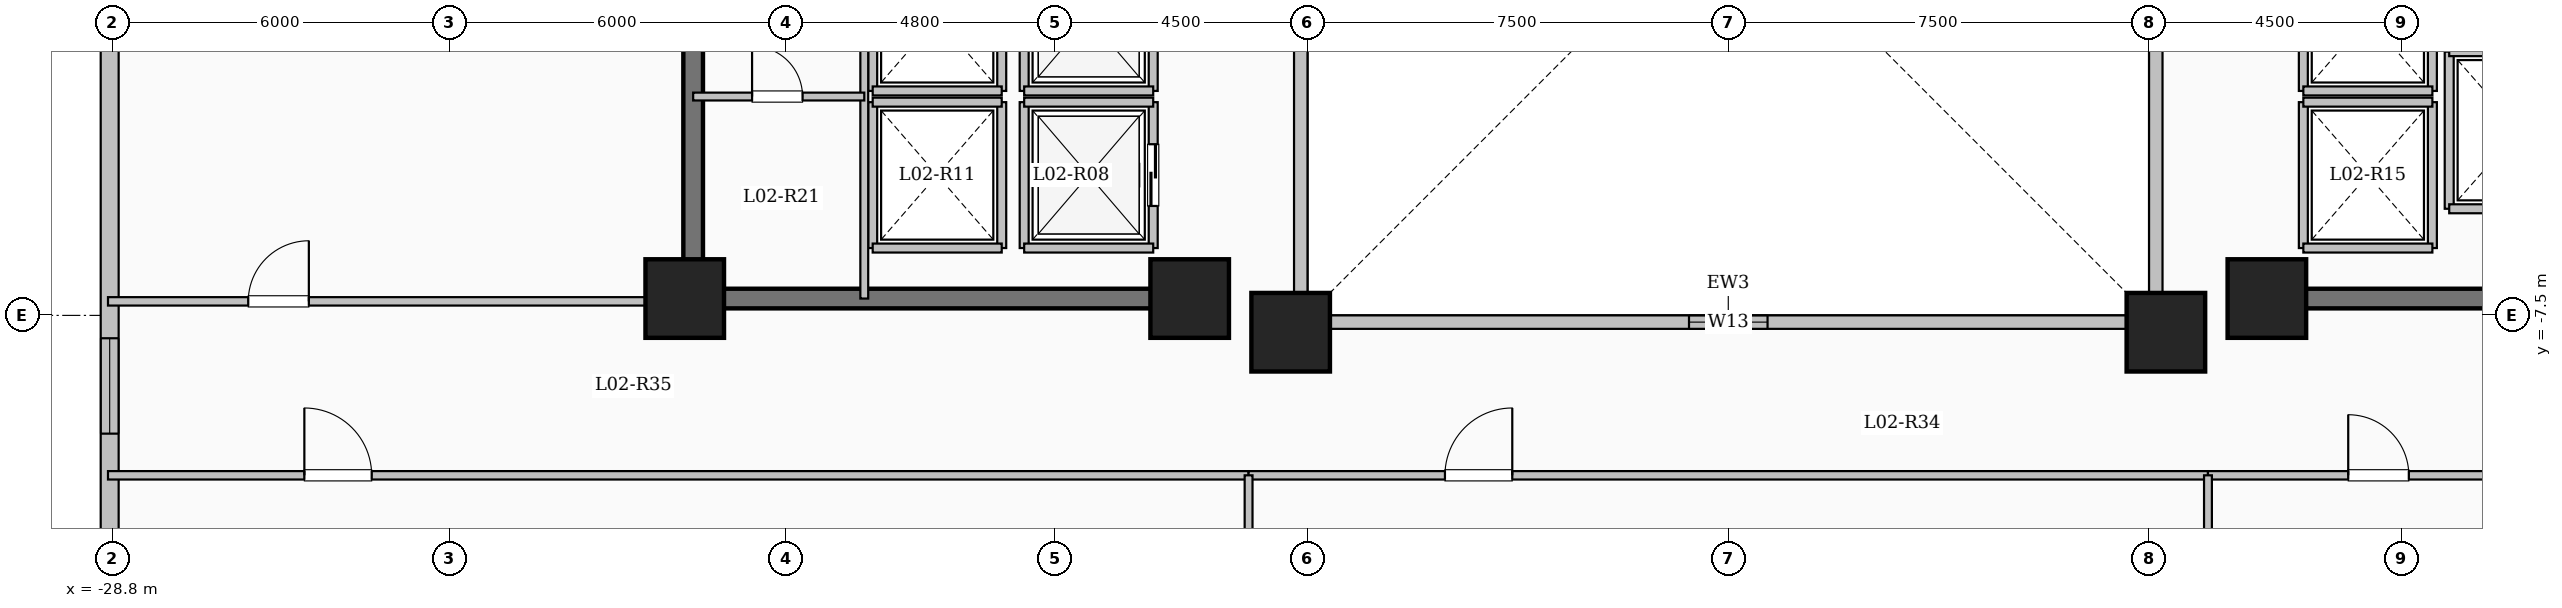
"""IFC4 building model, lengths in metres.
Left out: names, types, materials, properties, quantities, classifications, styles, units other than length and angle.
Written with IfcOpenShell. Run it as: python <this file> out.ifc"""

import sys

from ifc_helpers import new_model, si_unit, direction, frame, frame_2d, origin, origin_2d, place, context, subcontext, project, spatial, rectangle, extrude, element, fill, save


model = new_model("IFC4")
c1 = context("Model", 3, precision=1e-05, world=origin(), true_north=direction((0.0, 1.0)))
c2 = subcontext(c1, "Body", "Model", "MODEL_VIEW")
j1 = project(units=[si_unit("LENGTHUNIT", "METRE"), si_unit("PLANEANGLEUNIT", "RADIAN")], contexts=[c1])
p1 = place(None, origin())
s1 = spatial("IfcSite", under=j1, at=p1, CompositionType="ELEMENT")
p2 = place(p1, origin())
s2 = spatial("IfcBuilding", under=s1, at=p2, CompositionType="ELEMENT")
p3 = place(p2, frame((0.0, 0.0, 9.9)))
s3 = spatial("IfcBuildingStorey", under=s2, at=p3, CompositionType="ELEMENT", Elevation=9.9)
for number, where, z_axis, x_axis in (
    (1, (-7.8, -7.8, 0.0), (0.0, 0.0, 1.0), (1.0, 0.0, 0.0)),
    (2, (7.8, -7.8, 0.0), (0.0, 0.0, 1.0), (1.0, 0.0, 0.0)),
    (3, (-9.6, -7.2, 0.0), (0.0, 0.0, 1.0), (1.0, 0.0, 0.0)),
    (4, (9.6, -7.2, 0.0), (0.0, 0.0, 1.0), (1.0, 0.0, 0.0)),
    (5, (-18.6, -7.2, 0.0), (0.0, 0.0, 1.0), (1.0, 0.0, 0.0)),
):
    element("IfcColumn", number, at=place(p3, frame(where, z_axis=z_axis, x_axis=x_axis)), inside=s3, PredefinedType="COLUMN", context=c2, shape_type="SweptSolid", body=[
        extrude(rectangle(XDim=1.4, YDim=1.4, at=origin_2d()), origin(), (0.0, 0.0, 1.0), 4.5),
    ])
p4 = place(p3, frame((-7.62, -7.62, 0.0), z_axis=(0.0, 0.0, 1.0), x_axis=(1.0, 0.0, 0.0)))
e6 = element("IfcWall", 6, at=p4, inside=s3, PredefinedType="SOLIDWALL", context=c2, shape_type="SweptSolid", body=[
    extrude(rectangle(XDim=15.24, YDim=0.24, at=frame_2d((7.62, 0.0))), origin(), (0.0, 0.0, 1.0), 4.2),
])
p5 = place(p4, frame((6.92, 0.0, 0.95)))
e7 = element("IfcOpeningElement", 7, at=p5, cuts=e6, PredefinedType="OPENING", context=c2, shape_type="SweptSolid", body=[
    extrude(rectangle(XDim=1.4, YDim=1.5, at=frame_2d((0.7, 0.75))), frame((0.0, 0.13, 0.0), z_axis=(0.0, -1.0, 0.0), x_axis=(1.0, 0.0, 0.0)), (0.0, 0.0, 1.0), 0.26),
])
p6 = place(p3, frame((7.62, -7.62, 0.0), z_axis=(0.0, 0.0, 1.0), x_axis=(0.0, 1.0, 0.0)))
e8 = element("IfcWall", 8, at=p6, inside=s3, PredefinedType="SOLIDWALL", context=c2, shape_type="SweptSolid", body=[
    extrude(rectangle(XDim=15.24, YDim=0.24, at=frame_2d((7.62, 0.0))), origin(), (0.0, 0.0, 1.0), 4.2),
])
p7 = place(p6, frame((6.92, 0.0, 0.95)))
e9 = element("IfcOpeningElement", 9, at=p7, cuts=e8, PredefinedType="OPENING", context=c2, shape_type="SweptSolid", body=[
    extrude(rectangle(XDim=1.4, YDim=1.5, at=frame_2d((0.7, 0.75))), frame((0.0, 0.13, 0.0), z_axis=(0.0, -1.0, 0.0), x_axis=(1.0, 0.0, 0.0)), (0.0, 0.0, 1.0), 0.26),
])
p8 = place(p3, frame((-7.62, 7.62, 0.0), z_axis=(0.0, 0.0, 1.0), x_axis=(0.0, -1.0, 0.0)))
e10 = element("IfcWall", 10, at=p8, inside=s3, PredefinedType="SOLIDWALL", context=c2, shape_type="SweptSolid", body=[
    extrude(rectangle(XDim=15.24, YDim=0.24, at=frame_2d((7.62, 0.0))), origin(), (0.0, 0.0, 1.0), 4.2),
])
p9 = place(p8, frame((6.92, 0.0, 0.95)))
e11 = element("IfcOpeningElement", 11, at=p9, cuts=e10, PredefinedType="OPENING", context=c2, shape_type="SweptSolid", body=[
    extrude(rectangle(XDim=1.4, YDim=1.5, at=frame_2d((0.7, 0.75))), frame((0.0, 0.13, 0.0), z_axis=(0.0, -1.0, 0.0), x_axis=(1.0, 0.0, 0.0)), (0.0, 0.0, 1.0), 0.26),
])
p10 = place(p3, frame((-28.85, -29.85, 0.0), z_axis=(0.0, 0.0, 1.0), x_axis=(0.0, 1.0, 0.0)))
e12 = element("IfcWall", 12, at=p10, inside=s3, PredefinedType="SOLIDWALL", context=c2, shape_type="SweptSolid", body=[
    extrude(rectangle(XDim=59.7, YDim=0.32, at=frame_2d((29.85, 0.0))), origin(), (0.0, 0.0, 1.0), 4.2),
])
p11 = place(p10, frame((8.65, 0.0, 0.9)))
e13 = element("IfcOpeningElement", 13, at=p11, cuts=e12, PredefinedType="OPENING", context=c2, shape_type="SweptSolid", body=[
    extrude(rectangle(XDim=2.1, YDim=2.0, at=frame_2d((1.05, 1.0))), frame((0.0, 0.17, 0.0), z_axis=(0.0, -1.0, 0.0), x_axis=(1.0, 0.0, 0.0)), (0.0, 0.0, 1.0), 0.34),
])
p12 = place(p10, frame((20.242, 0.0, 0.9)))
e14 = element("IfcOpeningElement", 14, at=p12, cuts=e12, PredefinedType="OPENING", context=c2, shape_type="SweptSolid", body=[
    extrude(rectangle(XDim=1.7, YDim=1.9, at=frame_2d((0.85, 0.95))), frame((0.0, 0.17, 0.0), z_axis=(0.0, -1.0, 0.0), x_axis=(1.0, 0.0, 0.0)), (0.0, 0.0, 1.0), 0.34),
])
p13 = place(p10, frame((30.55, 0.0, 0.9)))
e15 = element("IfcOpeningElement", 15, at=p13, cuts=e12, PredefinedType="OPENING", context=c2, shape_type="SweptSolid", body=[
    extrude(rectangle(XDim=2.1, YDim=2.0, at=frame_2d((1.05, 1.0))), frame((0.0, 0.17, 0.0), z_axis=(0.0, -1.0, 0.0), x_axis=(1.0, 0.0, 0.0)), (0.0, 0.0, 1.0), 0.34),
])
p14 = place(p10, frame((40.975, 0.0, 0.95)))
e16 = element("IfcOpeningElement", 16, at=p14, cuts=e12, PredefinedType="OPENING", context=c2, shape_type="SweptSolid", body=[
    extrude(rectangle(XDim=1.0, YDim=1.5, at=frame_2d((0.5, 0.75))), frame((0.0, 0.17, 0.0), z_axis=(0.0, -1.0, 0.0), x_axis=(1.0, 0.0, 0.0)), (0.0, 0.0, 1.0), 0.34),
])
p15 = place(p10, frame((50.0, 0.0, 0.9)))
e17 = element("IfcOpeningElement", 17, at=p15, cuts=e12, PredefinedType="OPENING", context=c2, shape_type="SweptSolid", body=[
    extrude(rectangle(XDim=2.1, YDim=2.0, at=frame_2d((1.05, 1.0))), frame((0.0, 0.17, 0.0), z_axis=(0.0, -1.0, 0.0), x_axis=(1.0, 0.0, 0.0)), (0.0, 0.0, 1.0), 0.34),
])
p16 = place(p3, frame((-12.55, -6.3, 0.0), z_axis=(0.0, 0.0, 1.0), x_axis=(0.0, 1.0, 0.0)))
e18 = element("IfcWall", 18, at=p16, inside=s3, PredefinedType="SOLIDWALL", context=c2, shape_type="SweptSolid", body=[
    extrude(rectangle(XDim=2.6, YDim=0.16, at=frame_2d((1.3, 0.0))), origin(), (0.0, 0.0, 1.0), 4.2),
])
p17 = place(p3, frame((-10.25, -6.3, 0.0), z_axis=(0.0, 0.0, 1.0), x_axis=(0.0, 1.0, 0.0)))
e19 = element("IfcWall", 19, at=p17, inside=s3, PredefinedType="SOLIDWALL", context=c2, shape_type="SweptSolid", body=[
    extrude(rectangle(XDim=2.6, YDim=0.16, at=frame_2d((1.3, 0.0))), origin(), (0.0, 0.0, 1.0), 4.2),
])
p18 = place(p17, frame((0.75, 0.0, 0.0)))
e20 = element("IfcOpeningElement", 20, at=p18, cuts=e19, PredefinedType="OPENING", context=c2, shape_type="SweptSolid", body=[
    extrude(rectangle(XDim=1.1, YDim=2.15, at=frame_2d((0.55, 1.075))), frame((0.0, 0.09, 0.0), z_axis=(0.0, -1.0, 0.0), x_axis=(1.0, 0.0, 0.0)), (0.0, 0.0, 1.0), 0.18),
])
for number, where, z_axis, x_axis in (
    (21, (-12.55, -6.3, 0.0), (0.0, 0.0, 1.0), (1.0, 0.0, 0.0)),
    (22, (-12.55, -3.7, 0.0), (0.0, 0.0, 1.0), (1.0, 0.0, 0.0)),
):
    element("IfcWall", number, at=place(p3, frame(where, z_axis=z_axis, x_axis=x_axis)), inside=s3, PredefinedType="SOLIDWALL", context=c2, shape_type="SweptSolid", body=[
        extrude(rectangle(XDim=2.3, YDim=0.16, at=frame_2d((1.15, 0.0))), origin(), (0.0, 0.0, 1.0), 4.2),
    ])
p19 = place(p3, frame((-12.55, -3.5, 0.0), z_axis=(0.0, 0.0, 1.0), x_axis=(0.0, 1.0, 0.0)))
e23 = element("IfcWall", 23, at=p19, inside=s3, PredefinedType="SOLIDWALL", context=c2, shape_type="SweptSolid", body=[
    extrude(rectangle(XDim=2.6, YDim=0.16, at=frame_2d((1.3, 0.0))), origin(), (0.0, 0.0, 1.0), 4.2),
])
p20 = place(p3, frame((-10.25, -3.5, 0.0), z_axis=(0.0, 0.0, 1.0), x_axis=(0.0, 1.0, 0.0)))
e24 = element("IfcWall", 24, at=p20, inside=s3, PredefinedType="SOLIDWALL", context=c2, shape_type="SweptSolid", body=[
    extrude(rectangle(XDim=2.6, YDim=0.16, at=frame_2d((1.3, 0.0))), origin(), (0.0, 0.0, 1.0), 4.2),
])
p21 = place(p20, frame((0.75, 0.0, 0.0)))
e25 = element("IfcOpeningElement", 25, at=p21, cuts=e24, PredefinedType="OPENING", context=c2, shape_type="SweptSolid", body=[
    extrude(rectangle(XDim=1.1, YDim=2.15, at=frame_2d((0.55, 1.075))), frame((0.0, 0.09, 0.0), z_axis=(0.0, -1.0, 0.0), x_axis=(1.0, 0.0, 0.0)), (0.0, 0.0, 1.0), 0.18),
])
p22 = place(p3, frame((-12.55, -3.5, 0.0), z_axis=(0.0, 0.0, 1.0), x_axis=(1.0, 0.0, 0.0)))
e26 = element("IfcWall", 26, at=p22, inside=s3, PredefinedType="SOLIDWALL", context=c2, shape_type="SweptSolid", body=[
    extrude(rectangle(XDim=2.3, YDim=0.16, at=frame_2d((1.15, 0.0))), origin(), (0.0, 0.0, 1.0), 4.2),
])
for number, where, z_axis, x_axis in (
    (27, (-15.25, -6.3, 0.0), (0.0, 0.0, 1.0), (0.0, 1.0, 0.0)),
    (28, (-12.95, -6.3, 0.0), (0.0, 0.0, 1.0), (0.0, 1.0, 0.0)),
):
    element("IfcWall", number, at=place(p3, frame(where, z_axis=z_axis, x_axis=x_axis)), inside=s3, PredefinedType="SOLIDWALL", context=c2, shape_type="SweptSolid", body=[
        extrude(rectangle(XDim=2.6, YDim=0.16, at=frame_2d((1.3, 0.0))), origin(), (0.0, 0.0, 1.0), 4.2),
    ])
for number, where, z_axis, x_axis in (
    (29, (-15.25, -6.3, 0.0), (0.0, 0.0, 1.0), (1.0, 0.0, 0.0)),
    (30, (-15.25, -3.7, 0.0), (0.0, 0.0, 1.0), (1.0, 0.0, 0.0)),
):
    element("IfcWall", number, at=place(p3, frame(where, z_axis=z_axis, x_axis=x_axis)), inside=s3, PredefinedType="SOLIDWALL", context=c2, shape_type="SweptSolid", body=[
        extrude(rectangle(XDim=2.3, YDim=0.16, at=frame_2d((1.15, 0.0))), origin(), (0.0, 0.0, 1.0), 4.2),
    ])
for number, where, z_axis, x_axis in (
    (31, (-15.25, -3.5, 0.0), (0.0, 0.0, 1.0), (0.0, 1.0, 0.0)),
    (32, (-12.95, -3.5, 0.0), (0.0, 0.0, 1.0), (0.0, 1.0, 0.0)),
):
    element("IfcWall", number, at=place(p3, frame(where, z_axis=z_axis, x_axis=x_axis)), inside=s3, PredefinedType="SOLIDWALL", context=c2, shape_type="SweptSolid", body=[
        extrude(rectangle(XDim=2.6, YDim=0.16, at=frame_2d((1.3, 0.0))), origin(), (0.0, 0.0, 1.0), 4.2),
    ])
p23 = place(p3, frame((-15.25, -3.5, 0.0), z_axis=(0.0, 0.0, 1.0), x_axis=(1.0, 0.0, 0.0)))
e33 = element("IfcWall", 33, at=p23, inside=s3, PredefinedType="SOLIDWALL", context=c2, shape_type="SweptSolid", body=[
    extrude(rectangle(XDim=2.3, YDim=0.16, at=frame_2d((1.15, 0.0))), origin(), (0.0, 0.0, 1.0), 4.2),
])
for number, where, z_axis, x_axis in (
    (34, (10.25, -6.3, 0.0), (0.0, 0.0, 1.0), (0.0, 1.0, 0.0)),
    (35, (12.55, -6.3, 0.0), (0.0, 0.0, 1.0), (0.0, 1.0, 0.0)),
):
    element("IfcWall", number, at=place(p3, frame(where, z_axis=z_axis, x_axis=x_axis)), inside=s3, PredefinedType="SOLIDWALL", context=c2, shape_type="SweptSolid", body=[
        extrude(rectangle(XDim=2.6, YDim=0.16, at=frame_2d((1.3, 0.0))), origin(), (0.0, 0.0, 1.0), 4.2),
    ])
for number, where, z_axis, x_axis in (
    (36, (10.25, -6.3, 0.0), (0.0, 0.0, 1.0), (1.0, 0.0, 0.0)),
    (37, (10.25, -3.7, 0.0), (0.0, 0.0, 1.0), (1.0, 0.0, 0.0)),
):
    element("IfcWall", number, at=place(p3, frame(where, z_axis=z_axis, x_axis=x_axis)), inside=s3, PredefinedType="SOLIDWALL", context=c2, shape_type="SweptSolid", body=[
        extrude(rectangle(XDim=2.3, YDim=0.16, at=frame_2d((1.15, 0.0))), origin(), (0.0, 0.0, 1.0), 4.2),
    ])
for number, where, z_axis, x_axis in (
    (38, (10.25, -3.5, 0.0), (0.0, 0.0, 1.0), (0.0, 1.0, 0.0)),
    (39, (12.55, -3.5, 0.0), (0.0, 0.0, 1.0), (0.0, 1.0, 0.0)),
):
    element("IfcWall", number, at=place(p3, frame(where, z_axis=z_axis, x_axis=x_axis)), inside=s3, PredefinedType="SOLIDWALL", context=c2, shape_type="SweptSolid", body=[
        extrude(rectangle(XDim=2.6, YDim=0.16, at=frame_2d((1.3, 0.0))), origin(), (0.0, 0.0, 1.0), 4.2),
    ])
p24 = place(p3, frame((10.25, -3.5, 0.0), z_axis=(0.0, 0.0, 1.0), x_axis=(1.0, 0.0, 0.0)))
e40 = element("IfcWall", 40, at=p24, inside=s3, PredefinedType="SOLIDWALL", context=c2, shape_type="SweptSolid", body=[
    extrude(rectangle(XDim=2.3, YDim=0.16, at=frame_2d((1.15, 0.0))), origin(), (0.0, 0.0, 1.0), 4.2),
])
p25 = place(p3, frame((12.85, -5.6, 0.0), z_axis=(0.0, 0.0, 1.0), x_axis=(0.0, 1.0, 0.0)))
e41 = element("IfcWall", 41, at=p25, inside=s3, PredefinedType="SOLIDWALL", context=c2, shape_type="SweptSolid", body=[
    extrude(rectangle(XDim=2.8, YDim=0.16, at=frame_2d((1.4, 0.0))), origin(), (0.0, 0.0, 1.0), 4.2),
])
for number, where, z_axis, x_axis in (
    (42, (12.85, -5.6, 0.0), (0.0, 0.0, 1.0), (1.0, 0.0, 0.0)),
    (43, (12.85, -2.8, 0.0), (0.0, 0.0, 1.0), (1.0, 0.0, 0.0)),
):
    element("IfcWall", number, at=place(p3, frame(where, z_axis=z_axis, x_axis=x_axis)), inside=s3, PredefinedType="SOLIDWALL", context=c2, shape_type="SweptSolid", body=[
        extrude(rectangle(XDim=2.5, YDim=0.16, at=frame_2d((1.25, 0.0))), origin(), (0.0, 0.0, 1.0), 4.2),
    ])
p26 = place(p3, frame((-18.45, -7.375, 0.0), z_axis=(0.0, 0.0, 1.0), x_axis=(0.0, 1.0, 0.0)))
e44 = element("IfcWall", 44, at=p26, inside=s3, PredefinedType="SHEAR", context=c2, shape_type="SweptSolid", body=[
    extrude(rectangle(XDim=14.05, YDim=0.35, at=frame_2d((7.025, 0.0))), origin(), (0.0, 0.0, 1.0), 4.5),
])
for number, where, z_axis, x_axis in (
    (45, (-18.625, -7.2, 0.0), (0.0, 0.0, 1.0), (1.0, 0.0, 0.0)),
    (46, (10.075, -7.2, 0.0), (0.0, 0.0, 1.0), (1.0, 0.0, 0.0)),
):
    element("IfcWall", number, at=place(p3, frame(where, z_axis=z_axis, x_axis=x_axis)), inside=s3, PredefinedType="SHEAR", context=c2, shape_type="SweptSolid", body=[
        extrude(rectangle(XDim=8.55, YDim=0.35, at=frame_2d((4.275, 0.0))), origin(), (0.0, 0.0, 1.0), 4.5),
    ])
p27 = place(p3, frame((-15.4, -7.2, 0.0), z_axis=(0.0, 0.0, 1.0), x_axis=(0.0, 1.0, 0.0)))
e47 = element("IfcWall", 47, at=p27, inside=s3, PredefinedType="PARTITIONING", context=c2, shape_type="SweptSolid", body=[
    extrude(rectangle(XDim=10.45, YDim=0.14, at=frame_2d((5.225, 0.0))), origin(), (0.0, 0.0, 1.0), 4.2),
])
p28 = place(p27, frame((9.25, 0.0, 0.0)))
e48 = element("IfcOpeningElement", 48, at=p28, cuts=e47, PredefinedType="OPENING", context=c2, shape_type="SweptSolid", body=[
    extrude(rectangle(XDim=0.9, YDim=2.08, at=frame_2d((0.45, 1.04))), frame((0.0, 0.08, 0.0), z_axis=(0.0, -1.0, 0.0), x_axis=(1.0, 0.0, 0.0)), (0.0, 0.0, 1.0), 0.16),
])
p29 = place(p3, frame((-18.45, -3.6, 0.0), z_axis=(0.0, 0.0, 1.0), x_axis=(1.0, 0.0, 0.0)))
e49 = element("IfcWall", 49, at=p29, inside=s3, PredefinedType="PARTITIONING", context=c2, shape_type="SweptSolid", body=[
    extrude(rectangle(XDim=3.05, YDim=0.14, at=frame_2d((1.525, 0.0))), origin(), (0.0, 0.0, 1.0), 4.2),
])
p30 = place(p29, frame((1.05, 0.0, 0.0)))
e50 = element("IfcOpeningElement", 50, at=p30, cuts=e49, PredefinedType="OPENING", context=c2, shape_type="SweptSolid", body=[
    extrude(rectangle(XDim=0.9, YDim=2.08, at=frame_2d((0.45, 1.04))), frame((0.0, 0.08, 0.0), z_axis=(0.0, -1.0, 0.0), x_axis=(1.0, 0.0, 0.0)), (0.0, 0.0, 1.0), 0.16),
])
p31 = place(p3, frame((-28.88, -10.35, 0.0), z_axis=(0.0, 0.0, 1.0), x_axis=(1.0, 0.0, 0.0)))
e51 = element("IfcWall", 51, at=p31, inside=s3, PredefinedType="PARTITIONING", context=c2, shape_type="SweptSolid", body=[
    extrude(rectangle(XDim=20.33, YDim=0.15, at=frame_2d((10.165, 0.0))), origin(), (0.0, 0.0, 1.0), 4.2),
])
p32 = place(p31, frame((3.5, 0.0, 0.0)))
e52 = element("IfcOpeningElement", 52, at=p32, cuts=e51, PredefinedType="OPENING", context=c2, shape_type="SweptSolid", body=[
    extrude(rectangle(XDim=1.2, YDim=2.15, at=frame_2d((0.6, 1.075))), frame((0.0, 0.085, 0.0), z_axis=(0.0, -1.0, 0.0), x_axis=(1.0, 0.0, 0.0)), (0.0, 0.0, 1.0), 0.17),
])
p33 = place(p3, frame((-8.55, -10.35, 0.0), z_axis=(0.0, 0.0, 1.0), x_axis=(1.0, 0.0, 0.0)))
e53 = element("IfcWall", 53, at=p33, inside=s3, PredefinedType="PARTITIONING", context=c2, shape_type="SweptSolid", body=[
    extrude(rectangle(XDim=17.1, YDim=0.15, at=frame_2d((8.55, 0.0))), origin(), (0.0, 0.0, 1.0), 4.2),
])
p34 = place(p33, frame((3.5, 0.0, 0.0)))
e54 = element("IfcOpeningElement", 54, at=p34, cuts=e53, PredefinedType="OPENING", context=c2, shape_type="SweptSolid", body=[
    extrude(rectangle(XDim=1.2, YDim=2.15, at=frame_2d((0.6, 1.075))), frame((0.0, 0.085, 0.0), z_axis=(0.0, -1.0, 0.0), x_axis=(1.0, 0.0, 0.0)), (0.0, 0.0, 1.0), 0.17),
])
p35 = place(p3, frame((8.55, -10.35, 0.0), z_axis=(0.0, 0.0, 1.0), x_axis=(1.0, 0.0, 0.0)))
e55 = element("IfcWall", 55, at=p35, inside=s3, PredefinedType="PARTITIONING", context=c2, shape_type="SweptSolid", body=[
    extrude(rectangle(XDim=20.33, YDim=0.15, at=frame_2d((10.165, 0.0))), origin(), (0.0, 0.0, 1.0), 4.2),
])
p36 = place(p35, frame((2.5, 0.0, 0.0)))
e56 = element("IfcOpeningElement", 56, at=p36, cuts=e55, PredefinedType="OPENING", context=c2, shape_type="SweptSolid", body=[
    extrude(rectangle(XDim=1.08, YDim=2.15, at=frame_2d((0.54, 1.075))), frame((0.0, 0.085, 0.0), z_axis=(0.0, -1.0, 0.0), x_axis=(1.0, 0.0, 0.0)), (0.0, 0.0, 1.0), 0.17),
])
for number, where, z_axis, x_axis in (
    (57, (-8.55, -29.88, 0.0), (0.0, 0.0, 1.0), (0.0, 1.0, 0.0)),
    (58, (8.55, -29.88, 0.0), (0.0, 0.0, 1.0), (0.0, 1.0, 0.0)),
):
    element("IfcWall", number, at=place(p3, frame(where, z_axis=z_axis, x_axis=x_axis)), inside=s3, PredefinedType="PARTITIONING", context=c2, shape_type="SweptSolid", body=[
        extrude(rectangle(XDim=19.53, YDim=0.14, at=frame_2d((9.765, 0.0))), origin(), (0.0, 0.0, 1.0), 4.2),
    ])
p37 = place(p3, frame((-28.88, -7.25, 0.0), z_axis=(0.0, 0.0, 1.0), x_axis=(1.0, 0.0, 0.0)))
e59 = element("IfcWall", 59, at=p37, inside=s3, PredefinedType="PARTITIONING", context=c2, shape_type="SweptSolid", body=[
    extrude(rectangle(XDim=10.43, YDim=0.15, at=frame_2d((5.215, 0.0))), origin(), (0.0, 0.0, 1.0), 4.2),
])
p38 = place(p37, frame((2.5, 0.0, 0.0)))
e60 = element("IfcOpeningElement", 60, at=p38, cuts=e59, PredefinedType="OPENING", context=c2, shape_type="SweptSolid", body=[
    extrude(rectangle(XDim=1.08, YDim=2.15, at=frame_2d((0.54, 1.075))), frame((0.0, 0.085, 0.0), z_axis=(0.0, -1.0, 0.0), x_axis=(1.0, 0.0, 0.0)), (0.0, 0.0, 1.0), 0.17),
])
p39 = place(p5, origin())
e61 = element("IfcWindow", 61, at=p39, inside=s3, PartitioningType="SINGLE_PANEL", PredefinedType="WINDOW", context=c2, shape_type="SweptSolid", body=[
    extrude(rectangle(XDim=1.4, YDim=1.5, at=frame_2d((0.7, 0.75))), frame((0.0, 0.03, 0.0), z_axis=(0.0, -1.0, 0.0), x_axis=(1.0, 0.0, 0.0)), (0.0, 0.0, 1.0), 0.06),
])
fill(e7, e61)
p40 = place(p12, origin())
e62 = element("IfcWindow", 62, at=p40, inside=s3, PartitioningType="SINGLE_PANEL", PredefinedType="WINDOW", context=c2, shape_type="SweptSolid", body=[
    extrude(rectangle(XDim=1.7, YDim=1.9, at=frame_2d((0.85, 0.95))), frame((0.0, 0.03, 0.0), z_axis=(0.0, -1.0, 0.0), x_axis=(1.0, 0.0, 0.0)), (0.0, 0.0, 1.0), 0.06),
])
fill(e14, e62)
p41 = place(p18, origin())
e63 = element("IfcDoor", 63, at=p41, inside=s3, OperationType="SLIDING_TO_LEFT", PredefinedType="DOOR", context=c2, shape_type="SweptSolid", body=[
    extrude(rectangle(XDim=1.1, YDim=2.15, at=frame_2d((0.55, 1.075))), frame((0.0, 0.025, 0.0), z_axis=(0.0, -1.0, 0.0), x_axis=(1.0, 0.0, 0.0)), (0.0, 0.0, 1.0), 0.05),
])
fill(e20, e63)
p42 = place(p30, origin())
e64 = element("IfcDoor", 64, at=p42, inside=s3, OperationType="SINGLE_SWING_LEFT", PredefinedType="DOOR", context=c2, shape_type="SweptSolid", body=[
    extrude(rectangle(XDim=0.9, YDim=2.08, at=frame_2d((0.45, 1.04))), frame((0.0, 0.025, 0.0), z_axis=(0.0, -1.0, 0.0), x_axis=(1.0, 0.0, 0.0)), (0.0, 0.0, 1.0), 0.05),
])
fill(e50, e64)
p43 = place(p32, origin())
e65 = element("IfcDoor", 65, at=p43, inside=s3, OperationType="SINGLE_SWING_LEFT", PredefinedType="DOOR", context=c2, shape_type="SweptSolid", body=[
    extrude(rectangle(XDim=1.2, YDim=2.15, at=frame_2d((0.6, 1.075))), frame((0.0, 0.025, 0.0), z_axis=(0.0, -1.0, 0.0), x_axis=(1.0, 0.0, 0.0)), (0.0, 0.0, 1.0), 0.05),
])
fill(e52, e65)
p44 = place(p34, origin())
e66 = element("IfcDoor", 66, at=p44, inside=s3, OperationType="SINGLE_SWING_RIGHT", PredefinedType="DOOR", context=c2, shape_type="SweptSolid", body=[
    extrude(rectangle(XDim=1.2, YDim=2.15, at=frame_2d((0.6, 1.075))), frame((0.0, 0.025, 0.0), z_axis=(0.0, -1.0, 0.0), x_axis=(1.0, 0.0, 0.0)), (0.0, 0.0, 1.0), 0.05),
])
fill(e54, e66)
p45 = place(p36, origin())
e67 = element("IfcDoor", 67, at=p45, inside=s3, OperationType="SINGLE_SWING_LEFT", PredefinedType="DOOR", context=c2, shape_type="SweptSolid", body=[
    extrude(rectangle(XDim=1.08, YDim=2.15, at=frame_2d((0.54, 1.075))), frame((0.0, 0.025, 0.0), z_axis=(0.0, -1.0, 0.0), x_axis=(1.0, 0.0, 0.0)), (0.0, 0.0, 1.0), 0.05),
])
fill(e56, e67)
p46 = place(p38, origin())
e68 = element("IfcDoor", 68, at=p46, inside=s3, OperationType="SINGLE_SWING_RIGHT", PredefinedType="DOOR", context=c2, shape_type="SweptSolid", body=[
    extrude(rectangle(XDim=1.08, YDim=2.15, at=frame_2d((0.54, 1.075))), frame((0.0, 0.025, 0.0), z_axis=(0.0, -1.0, 0.0), x_axis=(1.0, 0.0, 0.0)), (0.0, 0.0, 1.0), 0.05),
])
fill(e60, e68)
save(model, sys.argv[1])
